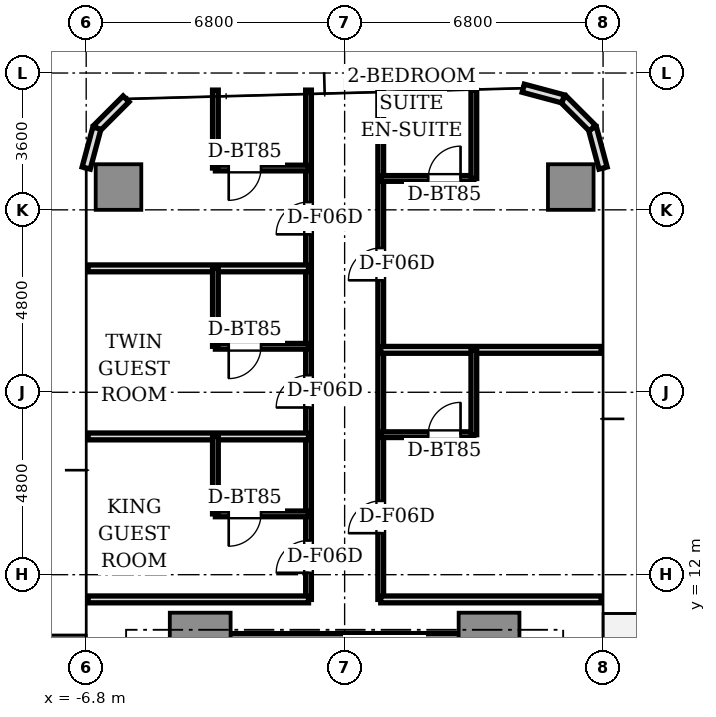
"""IFC4 building model, lengths in metres.
Left out: names, types, materials, properties, quantities, classifications, styles, units other than length and angle.
Written with IfcOpenShell. Run it as: python <this file> out.ifc"""

import sys

from ifc_helpers import new_model, si_unit, direction, frame, frame_2d, origin, origin_2d, place, context, subcontext, project, spatial, rectangle, extrude, source, transform, mapped, element, fill, save


model = new_model("IFC4")
c1 = context("Model", 3, precision=1e-05, world=origin(), true_north=direction((0.0, 1.0)))
c2 = subcontext(c1, "Body", "Model", "MODEL_VIEW")
j1 = project(units=[si_unit("LENGTHUNIT", "METRE"), si_unit("PLANEANGLEUNIT", "RADIAN")], contexts=[c1])
p1 = place(None, origin())
s1 = spatial("IfcSite", under=j1, at=p1, CompositionType="ELEMENT")
p2 = place(p1, origin())
s2 = spatial("IfcBuilding", under=s1, at=p2, CompositionType="ELEMENT")
p3 = place(p2, frame((0.0, 0.0, 61.1)))
s3 = spatial("IfcBuildingStorey", under=s2, at=p3, CompositionType="ELEMENT", Elevation=61.1)
p4 = place(p3, frame((-3.55, 10.2, 0.0), z_axis=(0.0, 0.0, 1.0), x_axis=(1.0, 0.0, 0.0)))
e1 = element("IfcWall", 1, at=p4, inside=s3, PredefinedType="SHEAR", context=c2, shape_type="SweptSolid", body=[
    extrude(rectangle(XDim=7.1, YDim=0.5, at=frame_2d((3.55, 0.0))), origin(), (0.0, 0.0, 1.0), 3.11),
])
m1 = source(origin(), c2, "Body", "SweptSolid", [
    extrude(rectangle(XDim=1.6, YDim=1.6, at=origin_2d()), origin(), (0.0, 0.0, 1.0), 3.11),
])
for number, where, z_axis, x_axis in (
    (2, (-3.8, 10.2, 0.0), (0.0, 0.0, 1.0), (1.0, 0.0, 0.0)),
    (3, (3.8, 10.2, 0.0), (0.0, 0.0, 1.0), (1.0, 0.0, 0.0)),
):
    element("IfcColumn", number, at=place(p3, frame(where, z_axis=z_axis, x_axis=x_axis)), inside=s3, PredefinedType="COLUMN", context=c2, shape_type="MappedRepresentation", body=[
        mapped(m1, transform((0.0, 0.0, 0.0), scale=1.0)),
    ])
m2 = source(origin(), c2, "Body", "SweptSolid", [
    extrude(rectangle(XDim=1.2, YDim=1.2, at=origin_2d()), origin(), (0.0, 0.0, 1.0), 3.11),
])
for number, where, z_axis, x_axis in (
    (4, (5.95, 22.2, 0.0), (0.0, 0.0, 1.0), (1.0, 0.0, 0.0)),
    (5, (-5.95, 22.2, 0.0), (0.0, 0.0, 1.0), (1.0, 0.0, 0.0)),
):
    element("IfcColumn", number, at=place(p3, frame(where, z_axis=z_axis, x_axis=x_axis)), inside=s3, PredefinedType="COLUMN", context=c2, shape_type="MappedRepresentation", body=[
        mapped(m2, transform((0.0, 0.0, 0.0), scale=1.0)),
    ])
for number, where, z_axis, x_axis in (
    (6, (6.8, 22.7, 0.0), (0.0, 0.0, 1.0), (-0.259, 0.966, 0.0)),
    (7, (6.519, 23.75, 0.0), (0.0, 0.0, 1.0), (-0.707, 0.707, 0.0)),
    (8, (5.75, 24.519, 0.0), (0.0, 0.0, 1.0), (-0.966, 0.259, 0.0)),
    (9, (-5.75, 24.519, 0.0), (0.0, 0.0, 1.0), (-0.707, -0.707, 0.0)),
    (10, (-6.519, 23.75, 0.0), (0.0, 0.0, 1.0), (-0.259, -0.966, 0.0)),
):
    element("IfcWall", number, at=place(p3, frame(where, z_axis=z_axis, x_axis=x_axis)), inside=s3, PredefinedType="STANDARD", context=c2, shape_type="SweptSolid", body=[
        extrude(rectangle(XDim=1.087, YDim=0.22, at=frame_2d((0.543, 0.0))), origin(), (0.0, 0.0, 1.0), 3.11),
    ])
p5 = place(p3, frame((-0.95, 11.35, 0.0), z_axis=(0.0, 0.0, 1.0), x_axis=(0.0, 1.0, 0.0)))
e11 = element("IfcWall", 11, at=p5, inside=s3, PredefinedType="PARTITIONING", context=c2, shape_type="SweptSolid", body=[
    extrude(rectangle(XDim=13.4, YDim=0.15, at=frame_2d((6.7, 0.0))), origin(), (0.0, 0.0, 1.0), 2.66),
])
p6 = place(p5, frame((0.7, 0.0, 0.0)))
e12 = element("IfcOpeningElement", 12, at=p6, cuts=e11, PredefinedType="OPENING", context=c2, shape_type="SweptSolid", body=[
    extrude(rectangle(XDim=0.85, YDim=2.1, at=frame_2d((0.425, 1.05))), frame((0.0, 0.085, 0.0), z_axis=(0.0, -1.0, 0.0), x_axis=(1.0, 0.0, 0.0)), (0.0, 0.0, 1.0), 0.17),
])
p7 = place(p5, frame((5.049, 0.0, 0.0)))
e13 = element("IfcOpeningElement", 13, at=p7, cuts=e11, PredefinedType="OPENING", context=c2, shape_type="SweptSolid", body=[
    extrude(rectangle(XDim=0.85, YDim=2.1, at=frame_2d((0.425, 1.05))), frame((0.0, 0.085, 0.0), z_axis=(0.0, -1.0, 0.0), x_axis=(1.0, 0.0, 0.0)), (0.0, 0.0, 1.0), 0.17),
])
p8 = place(p5, frame((9.605, 0.0, 0.0)))
e14 = element("IfcOpeningElement", 14, at=p8, cuts=e11, PredefinedType="OPENING", context=c2, shape_type="SweptSolid", body=[
    extrude(rectangle(XDim=0.85, YDim=2.1, at=frame_2d((0.425, 1.05))), frame((0.0, 0.085, 0.0), z_axis=(0.0, -1.0, 0.0), x_axis=(1.0, 0.0, 0.0)), (0.0, 0.0, 1.0), 0.17),
])
p9 = place(p3, frame((0.95, 11.35, 0.0), z_axis=(0.0, 0.0, 1.0), x_axis=(0.0, 1.0, 0.0)))
e15 = element("IfcWall", 15, at=p9, inside=s3, PredefinedType="PARTITIONING", context=c2, shape_type="SweptSolid", body=[
    extrude(rectangle(XDim=13.4, YDim=0.15, at=frame_2d((6.7, 0.0))), origin(), (0.0, 0.0, 1.0), 2.66),
])
p10 = place(p9, frame((1.742, 0.0, 0.0)))
e16 = element("IfcOpeningElement", 16, at=p10, cuts=e15, PredefinedType="OPENING", context=c2, shape_type="SweptSolid", body=[
    extrude(rectangle(XDim=0.85, YDim=2.1, at=frame_2d((0.425, 1.05))), frame((0.0, 0.085, 0.0), z_axis=(0.0, -1.0, 0.0), x_axis=(1.0, 0.0, 0.0)), (0.0, 0.0, 1.0), 0.17),
])
p11 = place(p9, frame((8.396, 0.0, 0.0)))
e17 = element("IfcOpeningElement", 17, at=p11, cuts=e15, PredefinedType="OPENING", context=c2, shape_type="SweptSolid", body=[
    extrude(rectangle(XDim=0.85, YDim=2.1, at=frame_2d((0.425, 1.05))), frame((0.0, 0.085, 0.0), z_axis=(0.0, -1.0, 0.0), x_axis=(1.0, 0.0, 0.0)), (0.0, 0.0, 1.0), 0.17),
])
for number, where, z_axis, x_axis in (
    (18, (-0.95, 11.35, 0.0), (0.0, 0.0, 1.0), (-1.0, 0.0, 0.0)),
    (19, (6.75, 11.35, 0.0), (0.0, 0.0, 1.0), (-1.0, 0.0, 0.0)),
    (20, (-0.95, 15.638, 0.0), (0.0, 0.0, 1.0), (-1.0, 0.0, 0.0)),
):
    element("IfcWall", number, at=place(p3, frame(where, z_axis=z_axis, x_axis=x_axis)), inside=s3, PredefinedType="PARTITIONING", context=c2, shape_type="SweptSolid", body=[
        extrude(rectangle(XDim=5.8, YDim=0.18, at=frame_2d((2.9, 0.0))), origin(), (0.0, 0.0, 1.0), 2.66),
    ])
p12 = place(p3, frame((-0.95, 13.6, 0.0), z_axis=(0.0, 0.0, 1.0), x_axis=(-1.0, 0.0, 0.0)))
e21 = element("IfcWall", 21, at=p12, inside=s3, PredefinedType="PARTITIONING", context=c2, shape_type="SweptSolid", body=[
    extrude(rectangle(XDim=2.45, YDim=0.15, at=frame_2d((1.225, 0.0))), origin(), (0.0, 0.0, 1.0), 2.66),
])
p13 = place(p12, frame((1.25, 0.0, 0.0)))
e22 = element("IfcOpeningElement", 22, at=p13, cuts=e21, PredefinedType="OPENING", context=c2, shape_type="SweptSolid", body=[
    extrude(rectangle(XDim=0.85, YDim=2.1, at=frame_2d((0.425, 1.05))), frame((0.0, 0.085, 0.0), z_axis=(0.0, -1.0, 0.0), x_axis=(1.0, 0.0, 0.0)), (0.0, 0.0, 1.0), 0.17),
])
p14 = place(p3, frame((-3.4, 13.6, 0.0), z_axis=(0.0, 0.0, 1.0), x_axis=(0.0, 1.0, 0.0)))
e23 = element("IfcWall", 23, at=p14, inside=s3, PredefinedType="PARTITIONING", context=c2, shape_type="SweptSolid", body=[
    extrude(rectangle(XDim=2.038, YDim=0.15, at=frame_2d((1.019, 0.0))), origin(), (0.0, 0.0, 1.0), 2.66),
])
p15 = place(p3, frame((-0.95, 20.06, 0.0), z_axis=(0.0, 0.0, 1.0), x_axis=(-1.0, 0.0, 0.0)))
e24 = element("IfcWall", 24, at=p15, inside=s3, PredefinedType="PARTITIONING", context=c2, shape_type="SweptSolid", body=[
    extrude(rectangle(XDim=5.8, YDim=0.18, at=frame_2d((2.9, 0.0))), origin(), (0.0, 0.0, 1.0), 2.66),
])
p16 = place(p3, frame((-0.95, 18.01, 0.0), z_axis=(0.0, 0.0, 1.0), x_axis=(-1.0, 0.0, 0.0)))
e25 = element("IfcWall", 25, at=p16, inside=s3, PredefinedType="PARTITIONING", context=c2, shape_type="SweptSolid", body=[
    extrude(rectangle(XDim=2.45, YDim=0.15, at=frame_2d((1.225, 0.0))), origin(), (0.0, 0.0, 1.0), 2.66),
])
p17 = place(p16, frame((1.25, 0.0, 0.0)))
e26 = element("IfcOpeningElement", 26, at=p17, cuts=e25, PredefinedType="OPENING", context=c2, shape_type="SweptSolid", body=[
    extrude(rectangle(XDim=0.85, YDim=2.1, at=frame_2d((0.425, 1.05))), frame((0.0, 0.085, 0.0), z_axis=(0.0, -1.0, 0.0), x_axis=(1.0, 0.0, 0.0)), (0.0, 0.0, 1.0), 0.17),
])
p18 = place(p3, frame((-3.4, 18.01, 0.0), z_axis=(0.0, 0.0, 1.0), x_axis=(0.0, 1.0, 0.0)))
e27 = element("IfcWall", 27, at=p18, inside=s3, PredefinedType="PARTITIONING", context=c2, shape_type="SweptSolid", body=[
    extrude(rectangle(XDim=2.05, YDim=0.15, at=frame_2d((1.025, 0.0))), origin(), (0.0, 0.0, 1.0), 2.66),
])
p19 = place(p3, frame((-0.95, 22.7, 0.0), z_axis=(0.0, 0.0, 1.0), x_axis=(-1.0, 0.0, 0.0)))
e28 = element("IfcWall", 28, at=p19, inside=s3, PredefinedType="PARTITIONING", context=c2, shape_type="SweptSolid", body=[
    extrude(rectangle(XDim=2.45, YDim=0.15, at=frame_2d((1.225, 0.0))), origin(), (0.0, 0.0, 1.0), 2.66),
])
p20 = place(p19, frame((1.25, 0.0, 0.0)))
e29 = element("IfcOpeningElement", 29, at=p20, cuts=e28, PredefinedType="OPENING", context=c2, shape_type="SweptSolid", body=[
    extrude(rectangle(XDim=0.85, YDim=2.1, at=frame_2d((0.425, 1.05))), frame((0.0, 0.085, 0.0), z_axis=(0.0, -1.0, 0.0), x_axis=(1.0, 0.0, 0.0)), (0.0, 0.0, 1.0), 0.17),
])
p21 = place(p3, frame((-3.4, 22.7, 0.0), z_axis=(0.0, 0.0, 1.0), x_axis=(0.0, 1.0, 0.0)))
e30 = element("IfcWall", 30, at=p21, inside=s3, PredefinedType="PARTITIONING", context=c2, shape_type="SweptSolid", body=[
    extrude(rectangle(XDim=2.05, YDim=0.15, at=frame_2d((1.025, 0.0))), origin(), (0.0, 0.0, 1.0), 2.66),
])
p22 = place(p3, frame((0.95, 17.916, 0.0), z_axis=(0.0, 0.0, 1.0), x_axis=(1.0, 0.0, 0.0)))
e31 = element("IfcWall", 31, at=p22, inside=s3, PredefinedType="PARTITIONING", context=c2, shape_type="SweptSolid", body=[
    extrude(rectangle(XDim=5.8, YDim=0.18, at=frame_2d((2.9, 0.0))), origin(), (0.0, 0.0, 1.0), 2.66),
])
p23 = place(p3, frame((0.95, 15.684, 0.0), z_axis=(0.0, 0.0, 1.0), x_axis=(1.0, 0.0, 0.0)))
e32 = element("IfcWall", 32, at=p23, inside=s3, PredefinedType="PARTITIONING", context=c2, shape_type="SweptSolid", body=[
    extrude(rectangle(XDim=2.45, YDim=0.15, at=frame_2d((1.225, 0.0))), origin(), (0.0, 0.0, 1.0), 2.66),
])
p24 = place(p23, frame((1.25, 0.0, 0.0)))
e33 = element("IfcOpeningElement", 33, at=p24, cuts=e32, PredefinedType="OPENING", context=c2, shape_type="SweptSolid", body=[
    extrude(rectangle(XDim=0.85, YDim=2.1, at=frame_2d((0.425, 1.05))), frame((0.0, 0.085, 0.0), z_axis=(0.0, -1.0, 0.0), x_axis=(1.0, 0.0, 0.0)), (0.0, 0.0, 1.0), 0.17),
])
p25 = place(p3, frame((3.4, 15.684, 0.0), z_axis=(0.0, 0.0, 1.0), x_axis=(0.0, 1.0, 0.0)))
e34 = element("IfcWall", 34, at=p25, inside=s3, PredefinedType="PARTITIONING", context=c2, shape_type="SweptSolid", body=[
    extrude(rectangle(XDim=2.232, YDim=0.15, at=frame_2d((1.116, 0.0))), origin(), (0.0, 0.0, 1.0), 2.66),
])
p26 = place(p3, frame((0.95, 22.426, 0.0), z_axis=(0.0, 0.0, 1.0), x_axis=(1.0, 0.0, 0.0)))
e35 = element("IfcWall", 35, at=p26, inside=s3, PredefinedType="PARTITIONING", context=c2, shape_type="SweptSolid", body=[
    extrude(rectangle(XDim=2.45, YDim=0.15, at=frame_2d((1.225, 0.0))), origin(), (0.0, 0.0, 1.0), 2.58),
])
p27 = place(p26, frame((1.25, 0.0, 0.0)))
e36 = element("IfcOpeningElement", 36, at=p27, cuts=e35, PredefinedType="OPENING", context=c2, shape_type="SweptSolid", body=[
    extrude(rectangle(XDim=0.85, YDim=2.1, at=frame_2d((0.425, 1.05))), frame((0.0, 0.085, 0.0), z_axis=(0.0, -1.0, 0.0), x_axis=(1.0, 0.0, 0.0)), (0.0, 0.0, 1.0), 0.17),
])
p28 = place(p3, frame((3.4, 22.426, 0.0), z_axis=(0.0, 0.0, 1.0), x_axis=(0.0, 1.0, 0.0)))
e37 = element("IfcWall", 37, at=p28, inside=s3, PredefinedType="PARTITIONING", context=c2, shape_type="SweptSolid", body=[
    extrude(rectangle(XDim=2.324, YDim=0.15, at=frame_2d((1.162, 0.0))), origin(), (0.0, 0.0, 1.0), 2.66),
])
m3 = source(origin(), c2, "Body", "SweptSolid", [
    extrude(rectangle(XDim=0.85, YDim=0.05, at=origin_2d()), origin(), (0.0, 0.0, 1.0), 2.1),
])
p29 = place(p13, frame((0.425, 0.0, 0.0)))
e38 = element("IfcDoor", 38, at=p29, inside=s3, OperationType="SINGLE_SWING_RIGHT", PredefinedType="DOOR", context=c2, shape_type="MappedRepresentation", body=[
    mapped(m3, transform((0.0, 0.0, 0.0), scale=1.0)),
])
fill(e22, e38)
p30 = place(p6, frame((0.425, 0.0, 0.0)))
e39 = element("IfcDoor", 39, at=p30, inside=s3, OperationType="SINGLE_SWING_LEFT", PredefinedType="DOOR", context=c2, shape_type="MappedRepresentation", body=[
    mapped(m3, transform((0.0, 0.0, 0.0), scale=1.0)),
])
fill(e12, e39)
p31 = place(p17, frame((0.425, 0.0, 0.0)))
e40 = element("IfcDoor", 40, at=p31, inside=s3, OperationType="SINGLE_SWING_RIGHT", PredefinedType="DOOR", context=c2, shape_type="MappedRepresentation", body=[
    mapped(m3, transform((0.0, 0.0, 0.0), scale=1.0)),
])
fill(e26, e40)
p32 = place(p7, frame((0.425, 0.0, 0.0)))
e41 = element("IfcDoor", 41, at=p32, inside=s3, OperationType="SINGLE_SWING_LEFT", PredefinedType="DOOR", context=c2, shape_type="MappedRepresentation", body=[
    mapped(m3, transform((0.0, 0.0, 0.0), scale=1.0)),
])
fill(e13, e41)
p33 = place(p20, frame((0.425, 0.0, 0.0)))
e42 = element("IfcDoor", 42, at=p33, inside=s3, OperationType="SINGLE_SWING_RIGHT", PredefinedType="DOOR", context=c2, shape_type="MappedRepresentation", body=[
    mapped(m3, transform((0.0, 0.0, 0.0), scale=1.0)),
])
fill(e29, e42)
p34 = place(p8, frame((0.425, 0.0, 0.0)))
e43 = element("IfcDoor", 43, at=p34, inside=s3, OperationType="SINGLE_SWING_LEFT", PredefinedType="DOOR", context=c2, shape_type="MappedRepresentation", body=[
    mapped(m3, transform((0.0, 0.0, 0.0), scale=1.0)),
])
fill(e14, e43)
p35 = place(p24, frame((0.425, 0.0, 0.0)))
e44 = element("IfcDoor", 44, at=p35, inside=s3, OperationType="SINGLE_SWING_RIGHT", PredefinedType="DOOR", context=c2, shape_type="MappedRepresentation", body=[
    mapped(m3, transform((0.0, 0.0, 0.0), scale=1.0)),
])
fill(e33, e44)
p36 = place(p10, frame((0.425, 0.0, 0.0)))
e45 = element("IfcDoor", 45, at=p36, inside=s3, OperationType="SINGLE_SWING_LEFT", PredefinedType="DOOR", context=c2, shape_type="MappedRepresentation", body=[
    mapped(m3, transform((0.0, 0.0, 0.0), scale=1.0)),
])
fill(e16, e45)
p37 = place(p27, frame((0.425, 0.0, 0.0)))
e46 = element("IfcDoor", 46, at=p37, inside=s3, OperationType="SINGLE_SWING_RIGHT", PredefinedType="DOOR", context=c2, shape_type="MappedRepresentation", body=[
    mapped(m3, transform((0.0, 0.0, 0.0), scale=1.0)),
])
fill(e36, e46)
p38 = place(p11, frame((0.425, 0.0, 0.0)))
e47 = element("IfcDoor", 47, at=p38, inside=s3, OperationType="SINGLE_SWING_LEFT", PredefinedType="DOOR", context=c2, shape_type="MappedRepresentation", body=[
    mapped(m3, transform((0.0, 0.0, 0.0), scale=1.0)),
])
fill(e17, e47)
save(model, sys.argv[1])
